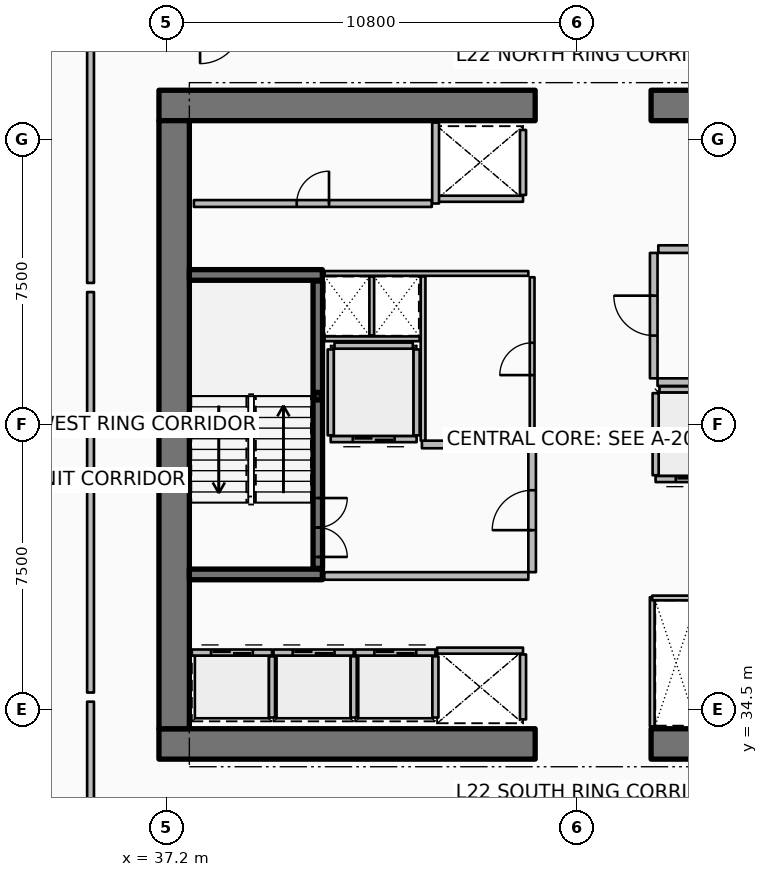
"""IFC4 building model, lengths in metres.
Left out: names, types, materials, properties, quantities, classifications, styles, units other than length and angle.
Written with IfcOpenShell. Run it as: python <this file> out.ifc"""

import sys

from ifc_helpers import new_model, si_unit, direction, frame, frame_2d, origin, origin_2d, place, context, subcontext, project, spatial, rectangle, hollow_rectangle, extrude, element, fill, save


model = new_model("IFC4")
c1 = context("Model", 3, precision=1e-05, world=origin(), true_north=direction((0.0, 1.0)))
c2 = subcontext(c1, "Body", "Model", "MODEL_VIEW")
j1 = project(units=[si_unit("LENGTHUNIT", "METRE"), si_unit("PLANEANGLEUNIT", "RADIAN")], contexts=[c1])
p1 = place(None, origin())
s1 = spatial("IfcSite", under=j1, at=p1, CompositionType="ELEMENT")
p2 = place(p1, origin())
s2 = spatial("IfcBuilding", under=s1, at=p2, CompositionType="ELEMENT")
p3 = place(p2, frame((0.0, 0.0, 90.15)))
s3 = spatial("IfcBuildingStorey", under=s2, at=p3, CompositionType="ELEMENT", Elevation=90.15)
p4 = place(p3, frame((37.0, 33.6, 0.0), z_axis=(0.0, 0.0, 1.0), x_axis=(1.0, 0.0, 0.0)))
e1 = element("IfcWall", 1, at=p4, inside=s3, PredefinedType="SHEAR", context=c2, shape_type="SweptSolid", body=[
    extrude(rectangle(XDim=9.9, YDim=0.8, at=frame_2d((4.95, 0.0))), origin(), (0.0, 0.0, 1.0), 3.75),
])
p5 = place(p3, frame((49.95, 33.6, 0.0), z_axis=(0.0, 0.0, 1.0), x_axis=(1.0, 0.0, 0.0)))
e2 = element("IfcWall", 2, at=p5, inside=s3, PredefinedType="SHEAR", context=c2, shape_type="SweptSolid", body=[
    extrude(rectangle(XDim=9.9, YDim=0.8, at=frame_2d((4.95, 0.0))), origin(), (0.0, 0.0, 1.0), 3.75),
])
p6 = place(p3, frame((37.0, 50.4, 0.0), z_axis=(0.0, 0.0, 1.0), x_axis=(1.0, 0.0, 0.0)))
e3 = element("IfcWall", 3, at=p6, inside=s3, PredefinedType="SHEAR", context=c2, shape_type="SweptSolid", body=[
    extrude(rectangle(XDim=9.9, YDim=0.8, at=frame_2d((4.95, 0.0))), origin(), (0.0, 0.0, 1.0), 3.75),
])
p7 = place(p3, frame((49.95, 50.4, 0.0), z_axis=(0.0, 0.0, 1.0), x_axis=(1.0, 0.0, 0.0)))
e4 = element("IfcWall", 4, at=p7, inside=s3, PredefinedType="SHEAR", context=c2, shape_type="SweptSolid", body=[
    extrude(rectangle(XDim=9.9, YDim=0.8, at=frame_2d((4.95, 0.0))), origin(), (0.0, 0.0, 1.0), 3.75),
])
p8 = place(p3, frame((37.4, 34.0, 0.0), z_axis=(0.0, 0.0, 1.0), x_axis=(0.0, 1.0, 0.0)))
e5 = element("IfcWall", 5, at=p8, inside=s3, PredefinedType="SHEAR", context=c2, shape_type="SweptSolid", body=[
    extrude(rectangle(XDim=16.0, YDim=0.8, at=frame_2d((8.0, 0.0))), origin(), (0.0, 0.0, 1.0), 3.75),
])
for number, where, z_axis, x_axis in (
    (6, (37.8, 38.06, 0.0), (0.0, 0.0, 1.0), (1.0, 0.0, 0.0)),
    (7, (37.8, 45.94, 0.0), (0.0, 0.0, 1.0), (1.0, 0.0, 0.0)),
):
    element("IfcWall", number, at=place(p3, frame(where, z_axis=z_axis, x_axis=x_axis)), inside=s3, PredefinedType="SHEAR", context=c2, shape_type="SweptSolid", body=[
        extrude(rectangle(XDim=3.5, YDim=0.28, at=frame_2d((1.75, 0.0))), origin(), (0.0, 0.0, 1.0), 3.75),
    ])
p9 = place(p3, frame((41.18, 42.75, 0.0), z_axis=(0.0, 0.0, 1.0), x_axis=(1.0, 0.0, 0.0)))
e8 = element("IfcColumn", 8, at=p9, inside=s3, PredefinedType="COLUMN", context=c2, shape_type="SweptSolid", body=[
    extrude(hollow_rectangle(XDim=0.2, YDim=0.2, WallThickness=0.01, InnerFilletRadius=0.01, OuterFilletRadius=0.02, at=origin_2d()), origin(), (0.0, 0.0, 1.0), 1.67),
])
p10 = place(p3, frame((41.18, 38.22, 0.0), z_axis=(0.0, 0.0, 1.0), x_axis=(0.0, 1.0, 0.0)))
e9 = element("IfcWall", 9, at=p10, inside=s3, PredefinedType="SOLIDWALL", context=c2, shape_type="SweptSolid", body=[
    extrude(rectangle(XDim=7.56, YDim=0.25, at=frame_2d((3.78, 0.0))), origin(), (0.0, 0.0, 1.0), 3.5),
])
p11 = place(p10, frame((0.3, 0.0, 0.0)))
e10 = element("IfcOpeningElement", 10, at=p11, cuts=e9, PredefinedType="OPENING", context=c2, shape_type="SweptSolid", body=[
    extrude(rectangle(XDim=1.55, YDim=2.15, at=frame_2d((0.775, 1.075))), frame((0.0, 0.135, 0.0), z_axis=(0.0, -1.0, 0.0), x_axis=(1.0, 0.0, 0.0)), (0.0, 0.0, 1.0), 0.27),
])
p12 = place(p3, frame((37.865, 36.005, 0.0), z_axis=(0.0, 0.0, 1.0), x_axis=(1.0, 0.0, 0.0)))
e11 = element("IfcWall", 11, at=p12, inside=s3, PredefinedType="PARTITIONING", context=c2, shape_type="SweptSolid", body=[
    extrude(rectangle(XDim=2.11, YDim=0.16, at=frame_2d((1.055, 0.0))), origin(), (0.0, 0.0, 1.0), 3.5),
])
p13 = place(p12, frame((0.505, 0.0, 0.0)))
e12 = element("IfcOpeningElement", 12, at=p13, cuts=e11, PredefinedType="OPENING", context=c2, shape_type="SweptSolid", body=[
    extrude(rectangle(XDim=1.1, YDim=2.1, at=frame_2d((0.55, 1.05))), frame((0.0, 0.09, 0.0), z_axis=(0.0, -1.0, 0.0), x_axis=(1.0, 0.0, 0.0)), (0.0, 0.0, 1.0), 0.18),
])
p14 = place(p3, frame((39.975, 34.295, 0.0), z_axis=(0.0, 0.0, 1.0), x_axis=(0.0, 1.0, 0.0)))
e13 = element("IfcWall", 13, at=p14, inside=s3, PredefinedType="PARTITIONING", context=c2, shape_type="SweptSolid", body=[
    extrude(rectangle(XDim=1.61, YDim=0.16, at=frame_2d((0.805, 0.0))), origin(), (0.0, 0.0, 1.0), 3.5),
])
p15 = place(p3, frame((40.015, 36.005, 0.0), z_axis=(0.0, 0.0, 1.0), x_axis=(1.0, 0.0, 0.0)))
e14 = element("IfcWall", 14, at=p15, inside=s3, PredefinedType="PARTITIONING", context=c2, shape_type="SweptSolid", body=[
    extrude(rectangle(XDim=2.11, YDim=0.16, at=frame_2d((1.055, 0.0))), origin(), (0.0, 0.0, 1.0), 3.5),
])
p16 = place(p15, frame((0.505, 0.0, 0.0)))
e15 = element("IfcOpeningElement", 15, at=p16, cuts=e14, PredefinedType="OPENING", context=c2, shape_type="SweptSolid", body=[
    extrude(rectangle(XDim=1.1, YDim=2.1, at=frame_2d((0.55, 1.05))), frame((0.0, 0.09, 0.0), z_axis=(0.0, -1.0, 0.0), x_axis=(1.0, 0.0, 0.0)), (0.0, 0.0, 1.0), 0.18),
])
p17 = place(p3, frame((42.125, 34.295, 0.0), z_axis=(0.0, 0.0, 1.0), x_axis=(0.0, 1.0, 0.0)))
e16 = element("IfcWall", 16, at=p17, inside=s3, PredefinedType="PARTITIONING", context=c2, shape_type="SweptSolid", body=[
    extrude(rectangle(XDim=1.61, YDim=0.16, at=frame_2d((0.805, 0.0))), origin(), (0.0, 0.0, 1.0), 3.5),
])
p18 = place(p3, frame((42.165, 36.005, 0.0), z_axis=(0.0, 0.0, 1.0), x_axis=(1.0, 0.0, 0.0)))
e17 = element("IfcWall", 17, at=p18, inside=s3, PredefinedType="PARTITIONING", context=c2, shape_type="SweptSolid", body=[
    extrude(rectangle(XDim=2.11, YDim=0.16, at=frame_2d((1.055, 0.0))), origin(), (0.0, 0.0, 1.0), 3.5),
])
p19 = place(p18, frame((0.505, 0.0, 0.0)))
e18 = element("IfcOpeningElement", 18, at=p19, cuts=e17, PredefinedType="OPENING", context=c2, shape_type="SweptSolid", body=[
    extrude(rectangle(XDim=1.1, YDim=2.1, at=frame_2d((0.55, 1.05))), frame((0.0, 0.09, 0.0), z_axis=(0.0, -1.0, 0.0), x_axis=(1.0, 0.0, 0.0)), (0.0, 0.0, 1.0), 0.18),
])
p20 = place(p3, frame((44.275, 34.295, 0.0), z_axis=(0.0, 0.0, 1.0), x_axis=(0.0, 1.0, 0.0)))
e19 = element("IfcWall", 19, at=p20, inside=s3, PredefinedType="PARTITIONING", context=c2, shape_type="SweptSolid", body=[
    extrude(rectangle(XDim=1.61, YDim=0.16, at=frame_2d((0.805, 0.0))), origin(), (0.0, 0.0, 1.0), 3.5),
])
p21 = place(p3, frame((46.58, 47.945, 0.0), z_axis=(0.0, 0.0, 1.0), x_axis=(-1.0, 0.0, 0.0)))
e20 = element("IfcWall", 20, at=p21, inside=s3, PredefinedType="PARTITIONING", context=c2, shape_type="SweptSolid", body=[
    extrude(rectangle(XDim=2.26, YDim=0.16, at=frame_2d((1.13, 0.0))), origin(), (0.0, 0.0, 1.0), 3.5),
])
p22 = place(p3, frame((46.58, 48.045, 0.0), z_axis=(0.0, 0.0, 1.0), x_axis=(0.0, 1.0, 0.0)))
e21 = element("IfcWall", 21, at=p22, inside=s3, PredefinedType="PARTITIONING", context=c2, shape_type="SweptSolid", body=[
    extrude(rectangle(XDim=1.71, YDim=0.16, at=frame_2d((0.855, 0.0))), origin(), (0.0, 0.0, 1.0), 3.5),
])
p23 = place(p3, frame((44.32, 36.055, 0.0), z_axis=(0.0, 0.0, 1.0), x_axis=(1.0, 0.0, 0.0)))
e22 = element("IfcWall", 22, at=p23, inside=s3, PredefinedType="PARTITIONING", context=c2, shape_type="SweptSolid", body=[
    extrude(rectangle(XDim=2.26, YDim=0.16, at=frame_2d((1.13, 0.0))), origin(), (0.0, 0.0, 1.0), 3.5),
])
p24 = place(p3, frame((46.58, 34.245, 0.0), z_axis=(0.0, 0.0, 1.0), x_axis=(0.0, 1.0, 0.0)))
e23 = element("IfcWall", 23, at=p24, inside=s3, PredefinedType="PARTITIONING", context=c2, shape_type="SweptSolid", body=[
    extrude(rectangle(XDim=1.71, YDim=0.16, at=frame_2d((0.855, 0.0))), origin(), (0.0, 0.0, 1.0), 3.5),
])
p25 = place(p3, frame((43.78, 41.62, 0.0), z_axis=(0.0, 0.0, 1.0), x_axis=(-1.0, 0.0, 0.0)))
e24 = element("IfcWall", 24, at=p25, inside=s3, PredefinedType="PARTITIONING", context=c2, shape_type="SweptSolid", body=[
    extrude(rectangle(XDim=2.26, YDim=0.16, at=frame_2d((1.13, 0.0))), origin(), (0.0, 0.0, 1.0), 3.5),
])
p26 = place(p25, frame((0.58, 0.0, 0.0)))
e25 = element("IfcOpeningElement", 25, at=p26, cuts=e24, PredefinedType="OPENING", context=c2, shape_type="SweptSolid", body=[
    extrude(rectangle(XDim=1.1, YDim=2.1, at=frame_2d((0.55, 1.05))), frame((0.0, 0.09, 0.0), z_axis=(0.0, -1.0, 0.0), x_axis=(1.0, 0.0, 0.0)), (0.0, 0.0, 1.0), 0.18),
])
for number, where, z_axis, x_axis in (
    (26, (43.78, 41.72, 0.0), (0.0, 0.0, 1.0), (0.0, 1.0, 0.0)),
    (27, (41.52, 41.72, 0.0), (0.0, 0.0, 1.0), (0.0, 1.0, 0.0)),
):
    element("IfcWall", number, at=place(p3, frame(where, z_axis=z_axis, x_axis=x_axis)), inside=s3, PredefinedType="PARTITIONING", context=c2, shape_type="SweptSolid", body=[
        extrude(rectangle(XDim=2.26, YDim=0.16, at=frame_2d((1.13, 0.0))), origin(), (0.0, 0.0, 1.0), 3.5),
    ])
p27 = place(p3, frame((41.62, 44.08, 0.0), z_axis=(0.0, 0.0, 1.0), x_axis=(1.0, 0.0, 0.0)))
e28 = element("IfcWall", 28, at=p27, inside=s3, PredefinedType="PARTITIONING", context=c2, shape_type="SweptSolid", body=[
    extrude(rectangle(XDim=2.06, YDim=0.16, at=frame_2d((1.03, 0.0))), origin(), (0.0, 0.0, 1.0), 3.5),
])
p28 = place(p3, frame((52.23, 40.57, 0.0), z_axis=(0.0, 0.0, 1.0), x_axis=(-1.0, 0.0, 0.0)))
e29 = element("IfcWall", 29, at=p28, inside=s3, PredefinedType="PARTITIONING", context=c2, shape_type="SweptSolid", body=[
    extrude(rectangle(XDim=2.16, YDim=0.16, at=frame_2d((1.08, 0.0))), origin(), (0.0, 0.0, 1.0), 3.5),
])
p29 = place(p28, frame((0.53, 0.0, 0.0)))
e30 = element("IfcOpeningElement", 30, at=p29, cuts=e29, PredefinedType="OPENING", context=c2, shape_type="SweptSolid", body=[
    extrude(rectangle(XDim=1.1, YDim=2.1, at=frame_2d((0.55, 1.05))), frame((0.0, 0.09, 0.0), z_axis=(0.0, -1.0, 0.0), x_axis=(1.0, 0.0, 0.0)), (0.0, 0.0, 1.0), 0.18),
])
p30 = place(p3, frame((50.07, 40.67, 0.0), z_axis=(0.0, 0.0, 1.0), x_axis=(0.0, 1.0, 0.0)))
e31 = element("IfcWall", 31, at=p30, inside=s3, PredefinedType="PARTITIONING", context=c2, shape_type="SweptSolid", body=[
    extrude(rectangle(XDim=2.16, YDim=0.16, at=frame_2d((1.08, 0.0))), origin(), (0.0, 0.0, 1.0), 3.5),
])
p31 = place(p3, frame((50.17, 42.93, 0.0), z_axis=(0.0, 0.0, 1.0), x_axis=(1.0, 0.0, 0.0)))
e32 = element("IfcWall", 32, at=p31, inside=s3, PredefinedType="PARTITIONING", context=c2, shape_type="SweptSolid", body=[
    extrude(rectangle(XDim=1.96, YDim=0.16, at=frame_2d((0.98, 0.0))), origin(), (0.0, 0.0, 1.0), 3.5),
])
p32 = place(p3, frame((37.92, 47.82, 0.0), z_axis=(0.0, 0.0, 1.0), x_axis=(1.0, 0.0, 0.0)))
e33 = element("IfcWall", 33, at=p32, inside=s3, PredefinedType="PARTITIONING", context=c2, shape_type="SweptSolid", body=[
    extrude(rectangle(XDim=6.26, YDim=0.18, at=frame_2d((3.13, 0.0))), origin(), (0.0, 0.0, 1.0), 3.5),
])
p33 = place(p32, frame((2.705, 0.0, 0.0)))
e34 = element("IfcOpeningElement", 34, at=p33, cuts=e33, PredefinedType="OPENING", context=c2, shape_type="SweptSolid", body=[
    extrude(rectangle(XDim=0.85, YDim=2.06, at=frame_2d((0.425, 1.03))), frame((0.0, 0.1, 0.0), z_axis=(0.0, -1.0, 0.0), x_axis=(1.0, 0.0, 0.0)), (0.0, 0.0, 1.0), 0.2),
])
p34 = place(p3, frame((44.28, 47.82, 0.0), z_axis=(0.0, 0.0, 1.0), x_axis=(0.0, 1.0, 0.0)))
e35 = element("IfcWall", 35, at=p34, inside=s3, PredefinedType="PARTITIONING", context=c2, shape_type="SweptSolid", body=[
    extrude(rectangle(XDim=2.13, YDim=0.18, at=frame_2d((1.065, 0.0))), origin(), (0.0, 0.0, 1.0), 3.5),
])
p35 = place(p3, frame((41.35, 38.02, 0.0), z_axis=(0.0, 0.0, 1.0), x_axis=(1.0, 0.0, 0.0)))
e36 = element("IfcWall", 36, at=p35, inside=s3, PredefinedType="PARTITIONING", context=c2, shape_type="SweptSolid", body=[
    extrude(rectangle(XDim=5.37, YDim=0.2, at=frame_2d((2.685, 0.0))), origin(), (0.0, 0.0, 1.0), 3.5),
])
p36 = place(p3, frame((43.92, 41.48, 0.0), z_axis=(0.0, 0.0, 1.0), x_axis=(1.0, 0.0, 0.0)))
e37 = element("IfcWall", 37, at=p36, inside=s3, PredefinedType="PARTITIONING", context=c2, shape_type="SweptSolid", body=[
    extrude(rectangle(XDim=2.8, YDim=0.2, at=frame_2d((1.4, 0.0))), origin(), (0.0, 0.0, 1.0), 3.5),
])
p37 = place(p3, frame((46.82, 38.12, 0.0), z_axis=(0.0, 0.0, 1.0), x_axis=(0.0, 1.0, 0.0)))
e38 = element("IfcWall", 38, at=p37, inside=s3, PredefinedType="PARTITIONING", context=c2, shape_type="SweptSolid", body=[
    extrude(rectangle(XDim=3.26, YDim=0.2, at=frame_2d((1.63, 0.0))), origin(), (0.0, 0.0, 1.0), 3.5),
])
p38 = place(p37, frame((1.105, 0.0, 0.0)))
e39 = element("IfcOpeningElement", 39, at=p38, cuts=e38, PredefinedType="OPENING", context=c2, shape_type="SweptSolid", body=[
    extrude(rectangle(XDim=1.05, YDim=2.1, at=frame_2d((0.525, 1.05))), frame((0.0, 0.11, 0.0), z_axis=(0.0, -1.0, 0.0), x_axis=(1.0, 0.0, 0.0)), (0.0, 0.0, 1.0), 0.22),
])
p39 = place(p3, frame((50.12, 43.12, 0.0), z_axis=(0.0, 0.0, 1.0), x_axis=(1.0, 0.0, 0.0)))
e40 = element("IfcWall", 40, at=p39, inside=s3, PredefinedType="PARTITIONING", context=c2, shape_type="SweptSolid", body=[
    extrude(rectangle(XDim=8.88, YDim=0.2, at=frame_2d((4.44, 0.0))), origin(), (0.0, 0.0, 1.0), 3.5),
])
p40 = place(p3, frame((50.14, 46.62, 0.0), z_axis=(0.0, 0.0, 1.0), x_axis=(1.0, 0.0, 0.0)))
e41 = element("IfcWall", 41, at=p40, inside=s3, PredefinedType="PARTITIONING", context=c2, shape_type="SweptSolid", body=[
    extrude(rectangle(XDim=1.02, YDim=0.2, at=frame_2d((0.51, 0.0))), origin(), (0.0, 0.0, 1.0), 3.5),
])
p41 = place(p3, frame((50.02, 43.22, 0.0), z_axis=(0.0, 0.0, 1.0), x_axis=(0.0, 1.0, 0.0)))
e42 = element("IfcWall", 42, at=p41, inside=s3, PredefinedType="PARTITIONING", context=c2, shape_type="SweptSolid", body=[
    extrude(rectangle(XDim=3.3, YDim=0.2, at=frame_2d((1.65, 0.0))), origin(), (0.0, 0.0, 1.0), 3.5),
])
p42 = place(p41, frame((1.125, 0.0, 0.0)))
e43 = element("IfcOpeningElement", 43, at=p42, cuts=e42, PredefinedType="OPENING", context=c2, shape_type="SweptSolid", body=[
    extrude(rectangle(XDim=1.05, YDim=2.1, at=frame_2d((0.525, 1.05))), frame((0.0, 0.11, 0.0), z_axis=(0.0, -1.0, 0.0), x_axis=(1.0, 0.0, 0.0)), (0.0, 0.0, 1.0), 0.22),
])
p43 = place(p3, frame((41.36, 45.98, 0.0), z_axis=(0.0, 0.0, 1.0), x_axis=(1.0, 0.0, 0.0)))
e44 = element("IfcWall", 44, at=p43, inside=s3, PredefinedType="PARTITIONING", context=c2, shape_type="SweptSolid", body=[
    extrude(rectangle(XDim=5.36, YDim=0.125, at=frame_2d((2.68, 0.0))), origin(), (0.0, 0.0, 1.0), 2.94),
])
p44 = place(p3, frame((41.36, 44.26, 0.0), z_axis=(0.0, 0.0, 1.0), x_axis=(1.0, 0.0, 0.0)))
e45 = element("IfcWall", 45, at=p44, inside=s3, PredefinedType="PARTITIONING", context=c2, shape_type="SweptSolid", body=[
    extrude(rectangle(XDim=2.5, YDim=0.125, at=frame_2d((1.25, 0.0))), origin(), (0.0, 0.0, 1.0), 2.94),
])
p45 = place(p3, frame((42.6, 44.35, 0.0), z_axis=(0.0, 0.0, 1.0), x_axis=(0.0, 1.0, 0.0)))
e46 = element("IfcWall", 46, at=p45, inside=s3, PredefinedType="PARTITIONING", context=c2, shape_type="SweptSolid", body=[
    extrude(rectangle(XDim=1.55, YDim=0.125, at=frame_2d((0.775, 0.0))), origin(), (0.0, 0.0, 1.0), 2.94),
])
p46 = place(p3, frame((49.98, 34.06, 0.0), z_axis=(0.0, 0.0, 1.0), x_axis=(0.0, 1.0, 0.0)))
e47 = element("IfcWall", 47, at=p46, inside=s3, PredefinedType="PARTITIONING", context=c2, shape_type="SweptSolid", body=[
    extrude(rectangle(XDim=3.4, YDim=0.125, at=frame_2d((1.7, 0.0))), origin(), (0.0, 0.0, 1.0), 2.94),
])
p47 = place(p3, frame((49.98, 37.44, 0.0), z_axis=(0.0, 0.0, 1.0), x_axis=(1.0, 0.0, 0.0)))
e48 = element("IfcWall", 48, at=p47, inside=s3, PredefinedType="PARTITIONING", context=c2, shape_type="SweptSolid", body=[
    extrude(rectangle(XDim=1.26, YDim=0.125, at=frame_2d((0.63, 0.0))), origin(), (0.0, 0.0, 1.0), 2.94),
])
p48 = place(p3, frame((43.95, 41.58, 0.0), z_axis=(0.0, 0.0, 1.0), x_axis=(0.0, 1.0, 0.0)))
e49 = element("IfcWall", 49, at=p48, inside=s3, PredefinedType="PARTITIONING", context=c2, shape_type="SweptSolid", body=[
    extrude(rectangle(XDim=4.32, YDim=0.125, at=frame_2d((2.16, 0.0))), origin(), (0.0, 0.0, 1.0), 2.94),
])
p49 = place(p3, frame((46.82, 41.58, 0.0), z_axis=(0.0, 0.0, 1.0), x_axis=(0.0, 1.0, 0.0)))
e50 = element("IfcWall", 50, at=p49, inside=s3, PredefinedType="PARTITIONING", context=c2, shape_type="SweptSolid", body=[
    extrude(rectangle(XDim=4.3, YDim=0.125, at=frame_2d((2.15, 0.0))), origin(), (0.0, 0.0, 1.0), 2.94),
])
p50 = place(p49, frame((1.725, 0.0, 0.0)))
e51 = element("IfcOpeningElement", 51, at=p50, cuts=e50, PredefinedType="OPENING", context=c2, shape_type="SweptSolid", body=[
    extrude(rectangle(XDim=0.85, YDim=2.06, at=frame_2d((0.425, 1.03))), frame((0.0, 0.073, 0.0), z_axis=(0.0, -1.0, 0.0), x_axis=(1.0, 0.0, 0.0)), (0.0, 0.0, 1.0), 0.145),
])
p51 = place(p3, frame((35.2, 51.971, 0.0), z_axis=(0.0, 0.0, 1.0), x_axis=(0.0, -1.0, 0.0)))
e52 = element("IfcWall", 52, at=p51, inside=s3, PredefinedType="PARTITIONING", context=c2, shape_type="SweptSolid", body=[
    extrude(rectangle(XDim=6.241, YDim=0.18, at=frame_2d((3.12, 0.0))), origin(), (0.0, 0.0, 1.0), 2.94),
])
p52 = place(p3, frame((35.2, 45.49, 0.0), z_axis=(0.0, 0.0, 1.0), x_axis=(0.0, -1.0, 0.0)))
e53 = element("IfcWall", 53, at=p52, inside=s3, PredefinedType="PARTITIONING", context=c2, shape_type="SweptSolid", body=[
    extrude(rectangle(XDim=4.885, YDim=0.18, at=frame_2d((2.442, 0.0))), origin(), (0.0, 0.0, 1.0), 2.94),
])
p53 = place(p3, frame((35.2, 40.365, 0.0), z_axis=(0.0, 0.0, 1.0), x_axis=(0.0, -1.0, 0.0)))
e54 = element("IfcWall", 54, at=p53, inside=s3, PredefinedType="PARTITIONING", context=c2, shape_type="SweptSolid", body=[
    extrude(rectangle(XDim=5.413, YDim=0.18, at=frame_2d((2.707, 0.0))), origin(), (0.0, 0.0, 1.0), 2.94),
])
p54 = place(p3, frame((35.2, 34.712, 0.0), z_axis=(0.0, 0.0, 1.0), x_axis=(0.0, -1.0, 0.0)))
e55 = element("IfcWall", 55, at=p54, inside=s3, PredefinedType="PARTITIONING", context=c2, shape_type="SweptSolid", body=[
    extrude(rectangle(XDim=3.192, YDim=0.18, at=frame_2d((1.596, 0.0))), origin(), (0.0, 0.0, 1.0), 2.94),
])
p55 = place(p11, origin())
e56 = element("IfcDoor", 56, at=p55, inside=s3, OperationType="DOUBLE_DOOR_SINGLE_SWING", PredefinedType="DOOR", context=c2, shape_type="SweptSolid", body=[
    extrude(rectangle(XDim=1.55, YDim=2.15, at=frame_2d((0.775, 1.075))), frame((0.0, 0.025, 0.0), z_axis=(0.0, -1.0, 0.0), x_axis=(1.0, 0.0, 0.0)), (0.0, 0.0, 1.0), 0.05),
])
fill(e10, e56)
p56 = place(p13, origin())
e57 = element("IfcDoor", 57, at=p56, inside=s3, OperationType="DOUBLE_DOOR_SLIDING", PredefinedType="DOOR", context=c2, shape_type="SweptSolid", body=[
    extrude(rectangle(XDim=1.1, YDim=2.1, at=frame_2d((0.55, 1.05))), frame((0.0, 0.025, 0.0), z_axis=(0.0, -1.0, 0.0), x_axis=(1.0, 0.0, 0.0)), (0.0, 0.0, 1.0), 0.05),
])
fill(e12, e57)
p57 = place(p16, origin())
e58 = element("IfcDoor", 58, at=p57, inside=s3, OperationType="DOUBLE_DOOR_SLIDING", PredefinedType="DOOR", context=c2, shape_type="SweptSolid", body=[
    extrude(rectangle(XDim=1.1, YDim=2.1, at=frame_2d((0.55, 1.05))), frame((0.0, 0.025, 0.0), z_axis=(0.0, -1.0, 0.0), x_axis=(1.0, 0.0, 0.0)), (0.0, 0.0, 1.0), 0.05),
])
fill(e15, e58)
p58 = place(p19, origin())
e59 = element("IfcDoor", 59, at=p58, inside=s3, OperationType="DOUBLE_DOOR_SLIDING", PredefinedType="DOOR", context=c2, shape_type="SweptSolid", body=[
    extrude(rectangle(XDim=1.1, YDim=2.1, at=frame_2d((0.55, 1.05))), frame((0.0, 0.025, 0.0), z_axis=(0.0, -1.0, 0.0), x_axis=(1.0, 0.0, 0.0)), (0.0, 0.0, 1.0), 0.05),
])
fill(e18, e59)
p59 = place(p26, origin())
e60 = element("IfcDoor", 60, at=p59, inside=s3, OperationType="DOUBLE_DOOR_SLIDING", PredefinedType="DOOR", context=c2, shape_type="SweptSolid", body=[
    extrude(rectangle(XDim=1.1, YDim=2.1, at=frame_2d((0.55, 1.05))), frame((0.0, 0.025, 0.0), z_axis=(0.0, -1.0, 0.0), x_axis=(1.0, 0.0, 0.0)), (0.0, 0.0, 1.0), 0.05),
])
fill(e25, e60)
p60 = place(p29, origin())
e61 = element("IfcDoor", 61, at=p60, inside=s3, OperationType="DOUBLE_DOOR_SLIDING", PredefinedType="DOOR", context=c2, shape_type="SweptSolid", body=[
    extrude(rectangle(XDim=1.1, YDim=2.1, at=frame_2d((0.55, 1.05))), frame((0.0, 0.025, 0.0), z_axis=(0.0, -1.0, 0.0), x_axis=(1.0, 0.0, 0.0)), (0.0, 0.0, 1.0), 0.05),
])
fill(e30, e61)
p61 = place(p33, origin())
e62 = element("IfcDoor", 62, at=p61, inside=s3, OperationType="SINGLE_SWING_RIGHT", PredefinedType="DOOR", context=c2, shape_type="SweptSolid", body=[
    extrude(rectangle(XDim=0.85, YDim=2.06, at=frame_2d((0.425, 1.03))), frame((0.0, 0.025, 0.0), z_axis=(0.0, -1.0, 0.0), x_axis=(1.0, 0.0, 0.0)), (0.0, 0.0, 1.0), 0.05),
])
fill(e34, e62)
p62 = place(p38, origin())
e63 = element("IfcDoor", 63, at=p62, inside=s3, OperationType="SINGLE_SWING_LEFT", PredefinedType="DOOR", context=c2, shape_type="SweptSolid", body=[
    extrude(rectangle(XDim=1.05, YDim=2.1, at=frame_2d((0.525, 1.05))), frame((0.0, 0.025, 0.0), z_axis=(0.0, -1.0, 0.0), x_axis=(1.0, 0.0, 0.0)), (0.0, 0.0, 1.0), 0.05),
])
fill(e39, e63)
p63 = place(p42, origin())
e64 = element("IfcDoor", 64, at=p63, inside=s3, OperationType="SINGLE_SWING_RIGHT", PredefinedType="DOOR", context=c2, shape_type="SweptSolid", body=[
    extrude(rectangle(XDim=1.05, YDim=2.1, at=frame_2d((0.525, 1.05))), frame((0.0, 0.025, 0.0), z_axis=(0.0, -1.0, 0.0), x_axis=(1.0, 0.0, 0.0)), (0.0, 0.0, 1.0), 0.05),
])
fill(e43, e64)
p64 = place(p50, origin())
e65 = element("IfcDoor", 65, at=p64, inside=s3, OperationType="SINGLE_SWING_LEFT", PredefinedType="DOOR", context=c2, shape_type="SweptSolid", body=[
    extrude(rectangle(XDim=0.85, YDim=2.06, at=frame_2d((0.425, 1.03))), frame((0.0, 0.025, 0.0), z_axis=(0.0, -1.0, 0.0), x_axis=(1.0, 0.0, 0.0)), (0.0, 0.0, 1.0), 0.05),
])
fill(e51, e65)
save(model, sys.argv[1])
